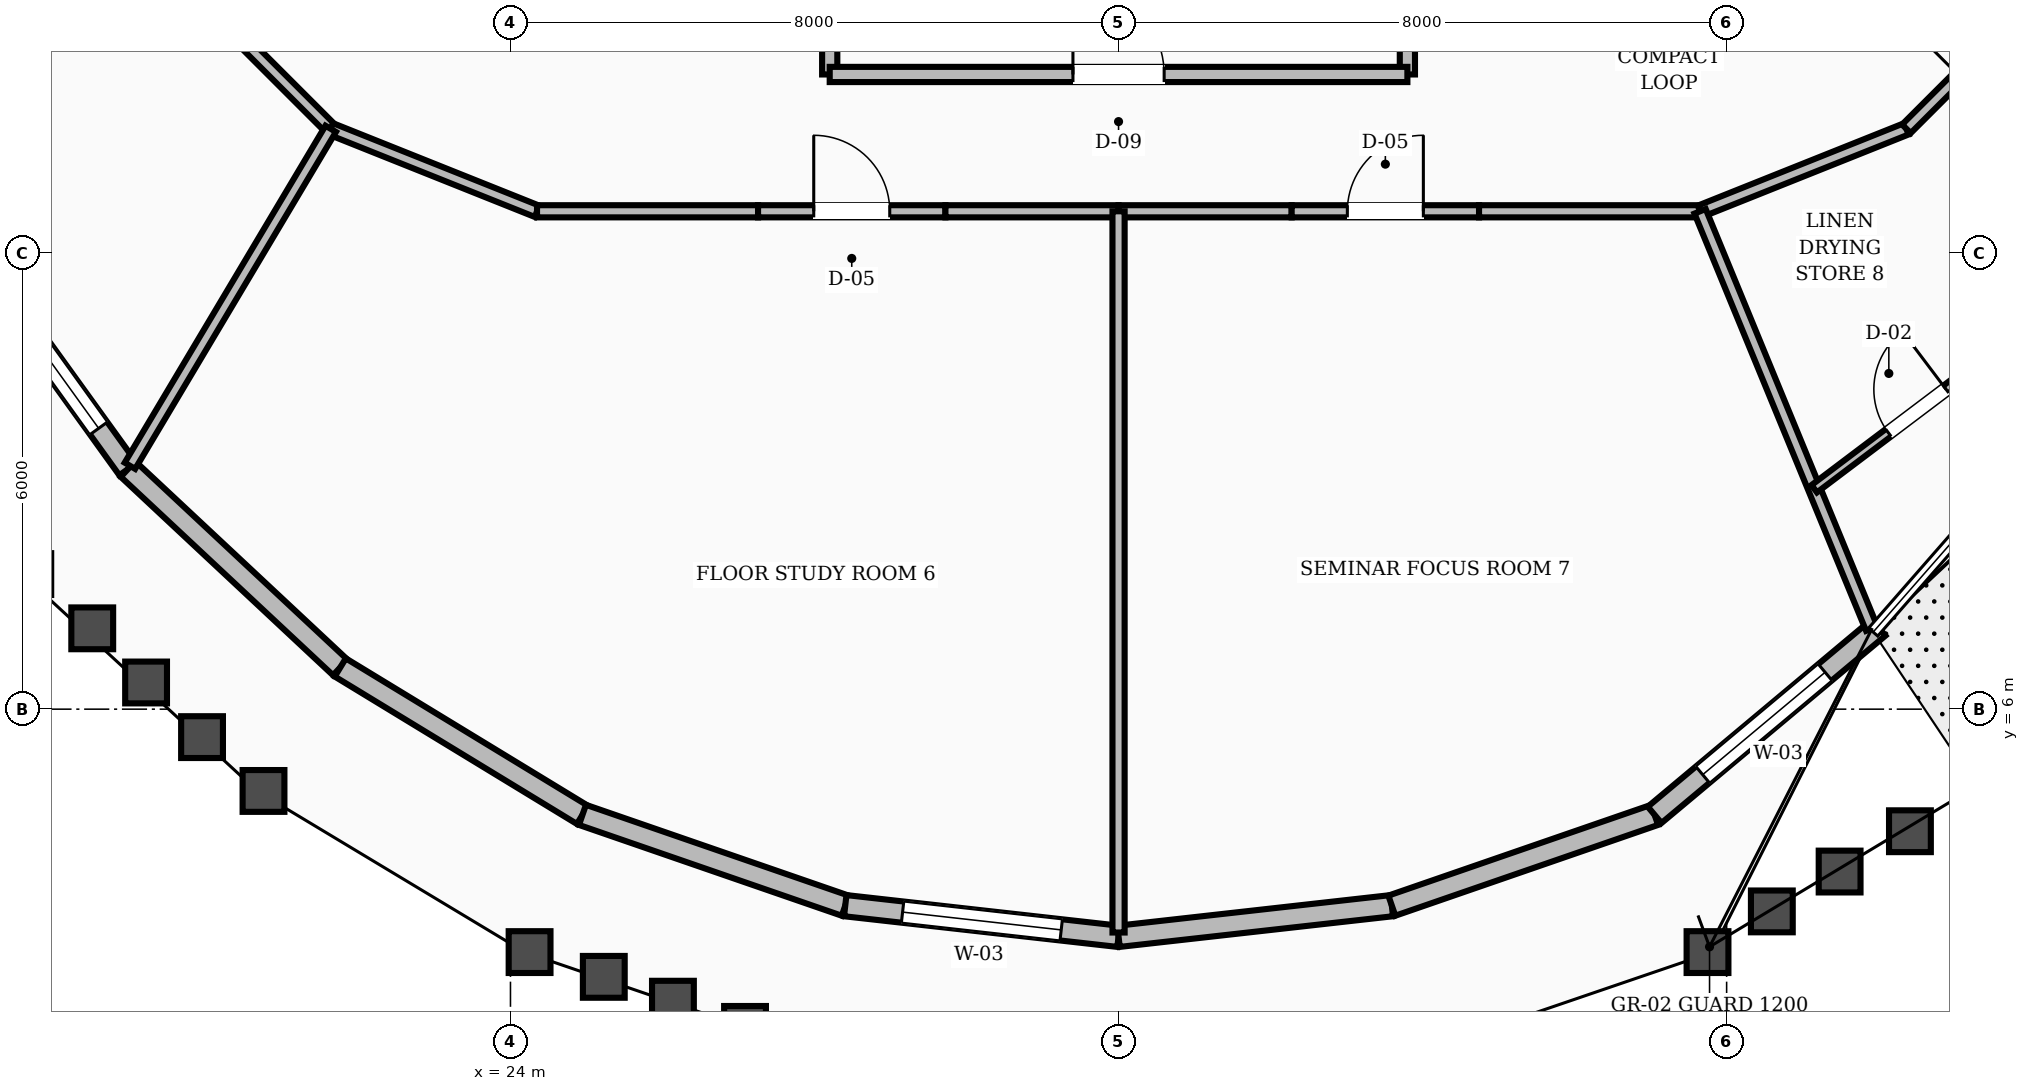
"""IFC4 building model, lengths in metres.
Left out: names, types, materials, properties, quantities, classifications, styles, units other than length and angle.
Written with IfcOpenShell. Run it as: python <this file> out.ifc"""

import sys

from ifc_helpers import new_model, si_unit, direction, frame, frame_2d, origin, place, context, subcontext, project, spatial, rectangle, extrude, element, fill, save


model = new_model("IFC4")
c1 = context("Model", 3, precision=1e-05, world=origin(), true_north=direction((0.0, 1.0)))
c2 = subcontext(c1, "Body", "Model", "MODEL_VIEW")
j1 = project(units=[si_unit("LENGTHUNIT", "METRE"), si_unit("PLANEANGLEUNIT", "RADIAN")], contexts=[c1])
p1 = place(None, origin())
s1 = spatial("IfcSite", under=j1, at=p1, CompositionType="ELEMENT")
p2 = place(p1, origin())
s2 = spatial("IfcBuilding", under=s1, at=p2, CompositionType="ELEMENT")
p3 = place(p2, frame((0.0, 0.0, 283.2)))
s3 = spatial("IfcBuildingStorey", under=s2, at=p3, CompositionType="ELEMENT", Elevation=283.2)
p4 = place(p3, frame((16.676, 12.339, 0.0), z_axis=(0.0, 0.0, 1.0), x_axis=(0.584655758142, -0.811281482884, 0.0)))
e1 = element("IfcWall", 1, at=p4, inside=s3, PredefinedType="STANDARD", context=c2, shape_type="SweptSolid", body=[
    extrude(rectangle(XDim=3.92, YDim=0.28, at=frame_2d((1.96, 0.0))), origin(), (0.0, 0.0, 1.0), 2.88),
])
p5 = place(p4, frame((0.66, 0.0, 0.8)))
e2 = element("IfcOpeningElement", 2, at=p5, cuts=e1, PredefinedType="OPENING", context=c2, shape_type="SweptSolid", body=[
    extrude(rectangle(XDim=2.6, YDim=1.65, at=frame_2d((1.3, 0.825))), frame((0.0, 0.15, 0.0), z_axis=(0.0, -1.0, 0.0), x_axis=(1.0, 0.0, 0.0)), (0.0, 0.0, 1.0), 0.3),
])
p6 = place(p3, frame((18.968, 9.159, 0.0), z_axis=(0.0, 0.0, 1.0), x_axis=(0.730558106244, -0.682850535184, 0.0)))
e3 = element("IfcWall", 3, at=p6, inside=s3, PredefinedType="STANDARD", context=c2, shape_type="SweptSolid", body=[
    extrude(rectangle(XDim=3.823, YDim=0.28, at=frame_2d((1.911, 0.0))), origin(), (0.0, 0.0, 1.0), 2.88),
])
p7 = place(p3, frame((21.761, 6.549, 0.0), z_axis=(0.0, 0.0, 1.0), x_axis=(0.854201083367, -0.519942794136, 0.0)))
e4 = element("IfcWall", 4, at=p7, inside=s3, PredefinedType="STANDARD", context=c2, shape_type="SweptSolid", body=[
    extrude(rectangle(XDim=3.73, YDim=0.28, at=frame_2d((1.865, 0.0))), origin(), (0.0, 0.0, 1.0), 2.88),
])
p8 = place(p3, frame((24.947, 4.609, 0.0), z_axis=(0.0, 0.0, 1.0), x_axis=(0.945189830933, -0.326521336976, 0.0)))
e5 = element("IfcWall", 5, at=p8, inside=s3, PredefinedType="STANDARD", context=c2, shape_type="SweptSolid", body=[
    extrude(rectangle(XDim=3.658, YDim=0.28, at=frame_2d((1.829, 0.0))), origin(), (0.0, 0.0, 1.0), 2.88),
])
p9 = place(p3, frame((28.405, 3.415, 0.0), z_axis=(0.0, 0.0, 1.0), x_axis=(0.993767154633, -0.111475747909, 0.0)))
e6 = element("IfcWall", 6, at=p9, inside=s3, PredefinedType="STANDARD", context=c2, shape_type="SweptSolid", body=[
    extrude(rectangle(XDim=3.618, YDim=0.28, at=frame_2d((1.809, 0.0))), origin(), (0.0, 0.0, 1.0), 2.88),
])
p10 = place(p9, frame((0.759, 0.0, 0.8)))
e7 = element("IfcOpeningElement", 7, at=p10, cuts=e6, PredefinedType="OPENING", context=c2, shape_type="SweptSolid", body=[
    extrude(rectangle(XDim=2.1, YDim=1.65, at=frame_2d((1.05, 0.825))), frame((0.0, 0.15, 0.0), z_axis=(0.0, -1.0, 0.0), x_axis=(1.0, 0.0, 0.0)), (0.0, 0.0, 1.0), 0.3),
])
p11 = place(p3, frame((32.0, 3.011, 0.0), z_axis=(0.0, 0.0, 1.0), x_axis=(0.993767154633, 0.111475747909, 0.0)))
e8 = element("IfcWall", 8, at=p11, inside=s3, PredefinedType="STANDARD", context=c2, shape_type="SweptSolid", body=[
    extrude(rectangle(XDim=3.618, YDim=0.28, at=frame_2d((1.809, 0.0))), origin(), (0.0, 0.0, 1.0), 2.88),
])
p12 = place(p3, frame((35.595, 3.415, 0.0), z_axis=(0.0, 0.0, 1.0), x_axis=(0.945189830933, 0.326521336976, 0.0)))
e9 = element("IfcWall", 9, at=p12, inside=s3, PredefinedType="STANDARD", context=c2, shape_type="SweptSolid", body=[
    extrude(rectangle(XDim=3.658, YDim=0.28, at=frame_2d((1.829, 0.0))), origin(), (0.0, 0.0, 1.0), 2.88),
])
p13 = place(p3, frame((39.053, 4.609, 0.0), z_axis=(0.0, 0.0, 1.0), x_axis=(0.767031932992, 0.641608925882, 0.0)))
e10 = element("IfcWall", 10, at=p13, inside=s3, PredefinedType="STANDARD", context=c2, shape_type="SweptSolid", body=[
    extrude(rectangle(XDim=3.841, YDim=0.28, at=frame_2d((1.92, 0.0))), origin(), (0.0, 0.0, 1.0), 2.88),
])
p14 = place(p13, frame((0.824, 0.0, 0.8)))
e11 = element("IfcOpeningElement", 11, at=p14, cuts=e10, PredefinedType="OPENING", context=c2, shape_type="SweptSolid", body=[
    extrude(rectangle(XDim=2.1, YDim=1.65, at=frame_2d((1.05, 0.825))), frame((0.0, 0.15, 0.0), z_axis=(0.0, -1.0, 0.0), x_axis=(1.0, 0.0, 0.0)), (0.0, 0.0, 1.0), 0.3),
])
for number, where, z_axis, x_axis in (
    (12, (28.2, 14.35, 0.0), (0.0, 0.0, 1.0), (0.0, 1.0, 0.0)),
    (13, (35.8, 14.35, 0.0), (0.0, 0.0, 1.0), (0.0, 1.0, 0.0)),
):
    element("IfcWall", number, at=place(p3, frame(where, z_axis=z_axis, x_axis=x_axis)), inside=s3, PredefinedType="SOLIDWALL", context=c2, shape_type="SweptSolid", body=[
        extrude(rectangle(XDim=2.2, YDim=0.2, at=frame_2d((1.1, 0.0))), origin(), (0.0, 0.0, 1.0), 2.87),
    ])
p15 = place(p3, frame((28.2, 14.35, 0.0), z_axis=(0.0, 0.0, 1.0), x_axis=(1.0, 0.0, 0.0)))
e14 = element("IfcWall", 14, at=p15, inside=s3, PredefinedType="SOLIDWALL", context=c2, shape_type="SweptSolid", body=[
    extrude(rectangle(XDim=7.6, YDim=0.2, at=frame_2d((3.8, 0.0))), origin(), (0.0, 0.0, 1.0), 2.87),
])
p16 = place(p15, frame((3.2, 0.0, 0.0)))
e15 = element("IfcOpeningElement", 15, at=p16, cuts=e14, PredefinedType="OPENING", context=c2, shape_type="SweptSolid", body=[
    extrude(rectangle(XDim=1.2, YDim=2.1, at=frame_2d((0.6, 1.05))), frame((0.0, 0.11, 0.0), z_axis=(0.0, -1.0, 0.0), x_axis=(1.0, 0.0, 0.0)), (0.0, 0.0, 1.0), 0.22),
])
p17 = place(p3, frame((19.573, 15.697, 0.0), z_axis=(0.0, 0.0, 1.0), x_axis=(0.707106781187, -0.707106781187, 0.0)))
e16 = element("IfcWall", 16, at=p17, inside=s3, PredefinedType="SOLIDWALL", context=c2, shape_type="SweptSolid", body=[
    extrude(rectangle(XDim=2.916, YDim=0.16, at=frame_2d((1.458, 0.0))), origin(), (0.0, 0.0, 1.0), 2.87),
])
p18 = place(p3, frame((21.635, 13.635, 0.0), z_axis=(0.0, 0.0, 1.0), x_axis=(0.92856882165, -0.371160266542, 0.0)))
e17 = element("IfcWall", 17, at=p18, inside=s3, PredefinedType="SOLIDWALL", context=c2, shape_type="SweptSolid", body=[
    extrude(rectangle(XDim=2.923, YDim=0.16, at=frame_2d((1.461, 0.0))), origin(), (0.0, 0.0, 1.0), 2.87),
])
p19 = place(p3, frame((24.349, 12.55, 0.0), z_axis=(0.0, 0.0, 1.0), x_axis=(1.0, 0.0, 0.0)))
e18 = element("IfcWall", 18, at=p19, inside=s3, PredefinedType="SOLIDWALL", context=c2, shape_type="SweptSolid", body=[
    extrude(rectangle(XDim=2.908, YDim=0.16, at=frame_2d((1.454, 0.0))), origin(), (0.0, 0.0, 1.0), 2.87),
])
p20 = place(p3, frame((27.257, 12.55, 0.0), z_axis=(0.0, 0.0, 1.0), x_axis=(1.0, 0.0, 0.0)))
e19 = element("IfcWall", 19, at=p20, inside=s3, PredefinedType="SOLIDWALL", context=c2, shape_type="SweptSolid", body=[
    extrude(rectangle(XDim=2.465, YDim=0.16, at=frame_2d((1.232, 0.0))), origin(), (0.0, 0.0, 1.0), 2.87),
])
p21 = place(p20, frame((0.733, 0.0, 0.0)))
e20 = element("IfcOpeningElement", 20, at=p21, cuts=e19, PredefinedType="OPENING", context=c2, shape_type="SweptSolid", body=[
    extrude(rectangle(XDim=1.0, YDim=2.1, at=frame_2d((0.5, 1.05))), frame((0.0, 0.09, 0.0), z_axis=(0.0, -1.0, 0.0), x_axis=(1.0, 0.0, 0.0)), (0.0, 0.0, 1.0), 0.18),
])
for number, where, z_axis, x_axis in (
    (21, (29.722, 12.55, 0.0), (0.0, 0.0, 1.0), (1.0, 0.0, 0.0)),
    (22, (32.0, 12.55, 0.0), (0.0, 0.0, 1.0), (1.0, 0.0, 0.0)),
):
    element("IfcWall", number, at=place(p3, frame(where, z_axis=z_axis, x_axis=x_axis)), inside=s3, PredefinedType="SOLIDWALL", context=c2, shape_type="SweptSolid", body=[
        extrude(rectangle(XDim=2.278, YDim=0.16, at=frame_2d((1.139, 0.0))), origin(), (0.0, 0.0, 1.0), 2.87),
    ])
p22 = place(p3, frame((34.278, 12.55, 0.0), z_axis=(0.0, 0.0, 1.0), x_axis=(1.0, 0.0, 0.0)))
e23 = element("IfcWall", 23, at=p22, inside=s3, PredefinedType="SOLIDWALL", context=c2, shape_type="SweptSolid", body=[
    extrude(rectangle(XDim=2.465, YDim=0.16, at=frame_2d((1.232, 0.0))), origin(), (0.0, 0.0, 1.0), 2.87),
])
p23 = place(p22, frame((0.733, 0.0, 0.0)))
e24 = element("IfcOpeningElement", 24, at=p23, cuts=e23, PredefinedType="OPENING", context=c2, shape_type="SweptSolid", body=[
    extrude(rectangle(XDim=1.0, YDim=2.1, at=frame_2d((0.5, 1.05))), frame((0.0, 0.09, 0.0), z_axis=(0.0, -1.0, 0.0), x_axis=(1.0, 0.0, 0.0)), (0.0, 0.0, 1.0), 0.18),
])
p24 = place(p3, frame((36.743, 12.55, 0.0), z_axis=(0.0, 0.0, 1.0), x_axis=(1.0, 0.0, 0.0)))
e25 = element("IfcWall", 25, at=p24, inside=s3, PredefinedType="SOLIDWALL", context=c2, shape_type="SweptSolid", body=[
    extrude(rectangle(XDim=2.908, YDim=0.16, at=frame_2d((1.454, 0.0))), origin(), (0.0, 0.0, 1.0), 2.87),
])
p25 = place(p3, frame((39.651, 12.55, 0.0), z_axis=(0.0, 0.0, 1.0), x_axis=(0.92856882165, 0.371160266542, 0.0)))
e26 = element("IfcWall", 26, at=p25, inside=s3, PredefinedType="SOLIDWALL", context=c2, shape_type="SweptSolid", body=[
    extrude(rectangle(XDim=2.923, YDim=0.16, at=frame_2d((1.461, 0.0))), origin(), (0.0, 0.0, 1.0), 2.87),
])
p26 = place(p3, frame((42.365, 13.635, 0.0), z_axis=(0.0, 0.0, 1.0), x_axis=(0.707106781187, 0.707106781187, 0.0)))
e27 = element("IfcWall", 27, at=p26, inside=s3, PredefinedType="SOLIDWALL", context=c2, shape_type="SweptSolid", body=[
    extrude(rectangle(XDim=2.916, YDim=0.16, at=frame_2d((1.458, 0.0))), origin(), (0.0, 0.0, 1.0), 2.87),
])
p27 = place(p26, frame((0.983, 0.0, 0.0)))
e28 = element("IfcOpeningElement", 28, at=p27, cuts=e27, PredefinedType="OPENING", context=c2, shape_type="SweptSolid", body=[
    extrude(rectangle(XDim=0.95, YDim=2.1, at=frame_2d((0.475, 1.05))), frame((0.0, 0.09, 0.0), z_axis=(0.0, -1.0, 0.0), x_axis=(1.0, 0.0, 0.0)), (0.0, 0.0, 1.0), 0.18),
])
p28 = place(p3, frame((21.635, 13.635, 0.0), z_axis=(0.0, 0.0, 1.0), x_axis=(-0.511821520019, -0.859091806296, 0.0)))
e29 = element("IfcWall", 29, at=p28, inside=s3, PredefinedType="SOLIDWALL", context=c2, shape_type="SweptSolid", body=[
    extrude(rectangle(XDim=5.16, YDim=0.16, at=frame_2d((2.58, 0.0))), origin(), (0.0, 0.0, 1.0), 2.87),
])
p29 = place(p3, frame((32.0, 12.55, 0.0), z_axis=(0.0, 0.0, 1.0), x_axis=(0.0, -1.0, 0.0)))
e30 = element("IfcWall", 30, at=p29, inside=s3, PredefinedType="SOLIDWALL", context=c2, shape_type="SweptSolid", body=[
    extrude(rectangle(XDim=9.489, YDim=0.16, at=frame_2d((4.744, 0.0))), origin(), (0.0, 0.0, 1.0), 2.87),
])
p30 = place(p3, frame((39.651, 12.55, 0.0), z_axis=(0.0, 0.0, 1.0), x_axis=(0.380449830374, -0.924801560643, 0.0)))
e31 = element("IfcWall", 31, at=p30, inside=s3, PredefinedType="SOLIDWALL", context=c2, shape_type="SweptSolid", body=[
    extrude(rectangle(XDim=5.936, YDim=0.16, at=frame_2d((2.968, 0.0))), origin(), (0.0, 0.0, 1.0), 2.87),
])
p31 = place(p3, frame((41.152, 8.899, 0.0), z_axis=(0.0, 0.0, 1.0), x_axis=(0.79826221148, 0.602310087682, 0.0)))
e32 = element("IfcWall", 32, at=p31, inside=s3, PredefinedType="PARTITIONING", context=c2, shape_type="SweptSolid", body=[
    extrude(rectangle(XDim=3.395, YDim=0.12, at=frame_2d((1.698, 0.0))), origin(), (0.0, 0.0, 1.0), 2.87),
])
p32 = place(p31, frame((1.222, 0.0, 0.0)))
e33 = element("IfcOpeningElement", 33, at=p32, cuts=e32, PredefinedType="OPENING", context=c2, shape_type="SweptSolid", body=[
    extrude(rectangle(XDim=0.95, YDim=2.1, at=frame_2d((0.475, 1.05))), frame((0.0, 0.07, 0.0), z_axis=(0.0, -1.0, 0.0), x_axis=(1.0, 0.0, 0.0)), (0.0, 0.0, 1.0), 0.14),
])
p33 = place(p5, origin())
e34 = element("IfcWindow", 34, at=p33, inside=s3, PartitioningType="SINGLE_PANEL", PredefinedType="WINDOW", context=c2, shape_type="SweptSolid", body=[
    extrude(rectangle(XDim=2.6, YDim=1.65, at=frame_2d((1.3, 0.825))), frame((0.0, 0.03, 0.0), z_axis=(0.0, -1.0, 0.0), x_axis=(1.0, 0.0, 0.0)), (0.0, 0.0, 1.0), 0.06),
])
fill(e2, e34)
p34 = place(p10, origin())
e35 = element("IfcWindow", 35, at=p34, inside=s3, PartitioningType="SINGLE_PANEL", PredefinedType="WINDOW", context=c2, shape_type="SweptSolid", body=[
    extrude(rectangle(XDim=2.1, YDim=1.65, at=frame_2d((1.05, 0.825))), frame((0.0, 0.03, 0.0), z_axis=(0.0, -1.0, 0.0), x_axis=(1.0, 0.0, 0.0)), (0.0, 0.0, 1.0), 0.06),
])
fill(e7, e35)
p35 = place(p14, origin())
e36 = element("IfcWindow", 36, at=p35, inside=s3, PartitioningType="SINGLE_PANEL", PredefinedType="WINDOW", context=c2, shape_type="SweptSolid", body=[
    extrude(rectangle(XDim=2.1, YDim=1.65, at=frame_2d((1.05, 0.825))), frame((0.0, 0.03, 0.0), z_axis=(0.0, -1.0, 0.0), x_axis=(1.0, 0.0, 0.0)), (0.0, 0.0, 1.0), 0.06),
])
fill(e11, e36)
p36 = place(p16, origin())
e37 = element("IfcDoor", 37, at=p36, inside=s3, OperationType="SINGLE_SWING_LEFT", PredefinedType="DOOR", context=c2, shape_type="SweptSolid", body=[
    extrude(rectangle(XDim=1.2, YDim=2.1, at=frame_2d((0.6, 1.05))), frame((0.0, 0.025, 0.0), z_axis=(0.0, -1.0, 0.0), x_axis=(1.0, 0.0, 0.0)), (0.0, 0.0, 1.0), 0.05),
])
fill(e15, e37)
p37 = place(p21, origin())
e38 = element("IfcDoor", 38, at=p37, inside=s3, OperationType="SINGLE_SWING_LEFT", PredefinedType="DOOR", context=c2, shape_type="SweptSolid", body=[
    extrude(rectangle(XDim=1.0, YDim=2.1, at=frame_2d((0.5, 1.05))), frame((0.0, 0.025, 0.0), z_axis=(0.0, -1.0, 0.0), x_axis=(1.0, 0.0, 0.0)), (0.0, 0.0, 1.0), 0.05),
])
fill(e20, e38)
p38 = place(p23, origin())
e39 = element("IfcDoor", 39, at=p38, inside=s3, OperationType="SINGLE_SWING_RIGHT", PredefinedType="DOOR", context=c2, shape_type="SweptSolid", body=[
    extrude(rectangle(XDim=1.0, YDim=2.1, at=frame_2d((0.5, 1.05))), frame((0.0, 0.025, 0.0), z_axis=(0.0, -1.0, 0.0), x_axis=(1.0, 0.0, 0.0)), (0.0, 0.0, 1.0), 0.05),
])
fill(e24, e39)
p39 = place(p32, origin())
e40 = element("IfcDoor", 40, at=p39, inside=s3, OperationType="SINGLE_SWING_RIGHT", PredefinedType="DOOR", context=c2, shape_type="SweptSolid", body=[
    extrude(rectangle(XDim=0.95, YDim=2.1, at=frame_2d((0.475, 1.05))), frame((0.0, 0.025, 0.0), z_axis=(0.0, -1.0, 0.0), x_axis=(1.0, 0.0, 0.0)), (0.0, 0.0, 1.0), 0.05),
])
fill(e33, e40)
save(model, sys.argv[1])
